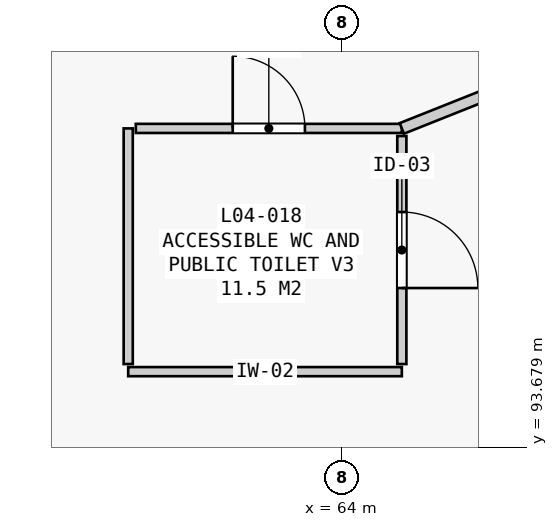
"""IFC4 building model, lengths in metres.
Left out: names, types, materials, properties, quantities, classifications, styles, units other than length and angle.
Written with IfcOpenShell. Run it as: python <this file> out.ifc"""

import sys

from ifc_helpers import new_model, si_unit, direction, frame, frame_2d, origin, place, context, subcontext, project, spatial, rectangle, extrude, element, fill, save


model = new_model("IFC4")
c1 = context("Model", 3, precision=1e-05, world=origin(), true_north=direction((0.0, 1.0)))
c2 = subcontext(c1, "Body", "Model", "MODEL_VIEW")
j1 = project(units=[si_unit("LENGTHUNIT", "METRE"), si_unit("PLANEANGLEUNIT", "RADIAN")], contexts=[c1])
p1 = place(None, origin())
s1 = spatial("IfcSite", under=j1, at=p1, CompositionType="ELEMENT")
p2 = place(p1, origin())
s2 = spatial("IfcBuilding", under=s1, at=p2, CompositionType="ELEMENT")
p3 = place(p2, frame((0.0, 0.0, 18.3)))
s3 = spatial("IfcBuildingStorey", under=s2, at=p3, CompositionType="ELEMENT", Elevation=18.3)
p4 = place(p3, frame((67.237, 93.653, 0.0), z_axis=(0.0, 0.0, 1.0), x_axis=(-0.926279468924, -0.376837293071, 0.0)))
e1 = element("IfcWall", 1, at=p4, inside=s3, PredefinedType="STANDARD", context=c2, shape_type="SweptSolid", body=[
    extrude(rectangle(XDim=3.898, YDim=0.28, at=frame_2d((1.949, 0.0))), origin(), (0.0, 0.0, 1.0), 0.72),
])
p5 = place(p3, frame((64.789, 94.675, 0.0), z_axis=(0.0, 0.0, 1.0), x_axis=(-1.0, 0.0, 0.0)))
e2 = element("IfcWall", 2, at=p5, inside=s3, PredefinedType="PARTITIONING", context=c2, shape_type="SweptSolid", body=[
    extrude(rectangle(XDim=3.6, YDim=0.12, at=frame_2d((1.8, 0.0))), origin(), (0.0, 0.0, 1.0), 3.94),
])
p6 = place(p3, frame((61.189, 94.775, 0.0), z_axis=(0.0, 0.0, 1.0), x_axis=(0.0, 1.0, 0.0)))
e3 = element("IfcWall", 3, at=p6, inside=s3, PredefinedType="PARTITIONING", context=c2, shape_type="SweptSolid", body=[
    extrude(rectangle(XDim=3.1, YDim=0.12, at=frame_2d((1.55, 0.0))), origin(), (0.0, 0.0, 1.0), 3.94),
])
p7 = place(p3, frame((61.289, 97.875, 0.0), z_axis=(0.0, 0.0, 1.0), x_axis=(1.0, 0.0, 0.0)))
e4 = element("IfcWall", 4, at=p7, inside=s3, PredefinedType="PARTITIONING", context=c2, shape_type="SweptSolid", body=[
    extrude(rectangle(XDim=3.5, YDim=0.12, at=frame_2d((1.75, 0.0))), origin(), (0.0, 0.0, 1.0), 3.94),
])
p8 = place(p7, frame((1.275, 0.0, 0.0)))
e5 = element("IfcOpeningElement", 5, at=p8, cuts=e4, PredefinedType="OPENING", context=c2, shape_type="SweptSolid", body=[
    extrude(rectangle(XDim=0.95, YDim=2.15, at=frame_2d((0.475, 1.075))), frame((0.0, 0.07, 0.0), z_axis=(0.0, -1.0, 0.0), x_axis=(1.0, 0.0, 0.0)), (0.0, 0.0, 1.0), 0.14),
])
p9 = place(p3, frame((64.789, 97.775, 0.0), z_axis=(0.0, 0.0, 1.0), x_axis=(0.0, -1.0, 0.0)))
e6 = element("IfcWall", 6, at=p9, inside=s3, PredefinedType="PARTITIONING", context=c2, shape_type="SweptSolid", body=[
    extrude(rectangle(XDim=3.0, YDim=0.12, at=frame_2d((1.5, 0.0))), origin(), (0.0, 0.0, 1.0), 3.94),
])
p10 = place(p9, frame((1.0, 0.0, 0.0)))
e7 = element("IfcOpeningElement", 7, at=p10, cuts=e6, PredefinedType="OPENING", context=c2, shape_type="SweptSolid", body=[
    extrude(rectangle(XDim=1.0, YDim=2.1, at=frame_2d((0.5, 1.05))), frame((0.0, 0.07, 0.0), z_axis=(0.0, -1.0, 0.0), x_axis=(1.0, 0.0, 0.0)), (0.0, 0.0, 1.0), 0.14),
])
p11 = place(p3, frame((64.789, 97.875, 0.0), z_axis=(0.0, 0.0, 1.0), x_axis=(0.9290488083, 0.369957175626, 0.0)))
e8 = element("IfcWall", 8, at=p11, inside=s3, PredefinedType="PARTITIONING", context=c2, shape_type="SweptSolid", body=[
    extrude(rectangle(XDim=1.439, YDim=0.15, at=frame_2d((0.72, 0.0))), origin(), (0.0, 0.0, 1.0), 3.94),
])
p12 = place(p8, origin())
e9 = element("IfcDoor", 9, at=p12, inside=s3, OperationType="SINGLE_SWING_LEFT", PredefinedType="DOOR", context=c2, shape_type="SweptSolid", body=[
    extrude(rectangle(XDim=0.95, YDim=2.15, at=frame_2d((0.475, 1.075))), frame((0.0, 0.025, 0.0), z_axis=(0.0, -1.0, 0.0), x_axis=(1.0, 0.0, 0.0)), (0.0, 0.0, 1.0), 0.05),
])
fill(e5, e9)
p13 = place(p10, origin())
e10 = element("IfcDoor", 10, at=p13, inside=s3, OperationType="SINGLE_SWING_RIGHT", PredefinedType="DOOR", context=c2, shape_type="SweptSolid", body=[
    extrude(rectangle(XDim=1.0, YDim=2.1, at=frame_2d((0.5, 1.05))), frame((0.0, 0.025, 0.0), z_axis=(0.0, -1.0, 0.0), x_axis=(1.0, 0.0, 0.0)), (0.0, 0.0, 1.0), 0.05),
])
fill(e7, e10)
save(model, sys.argv[1])
